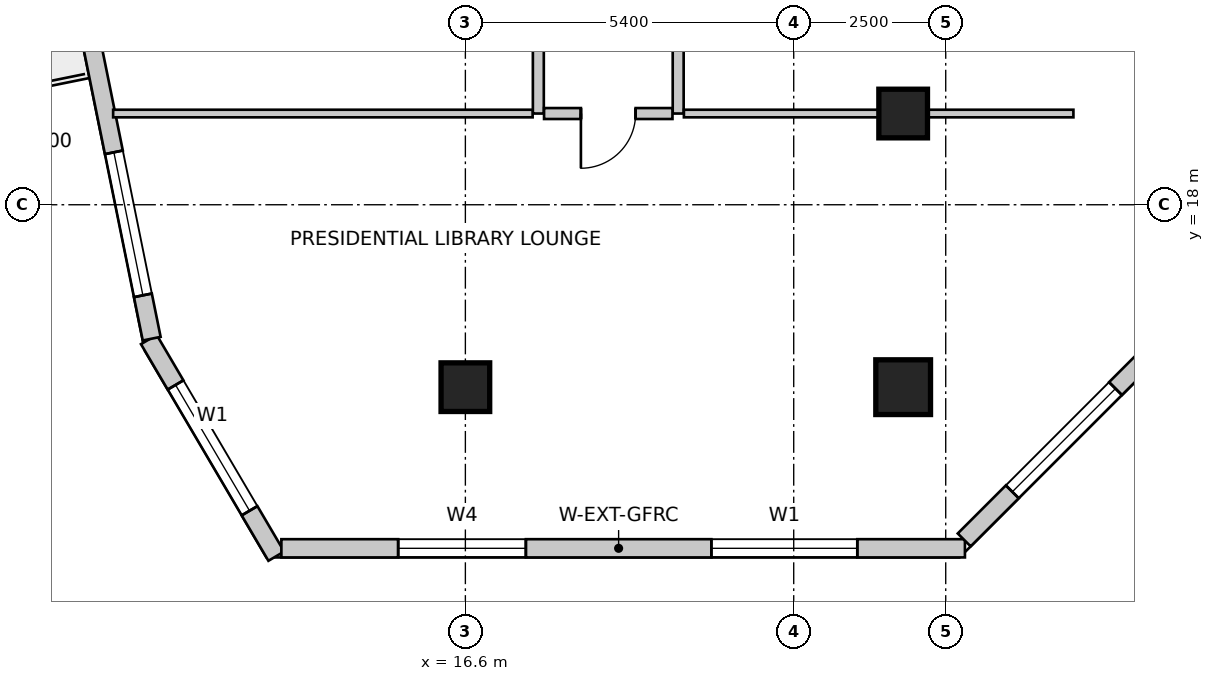
"""IFC4 building model, lengths in metres.
Left out: names, types, materials, properties, quantities, classifications, styles, units other than length and angle.
Written with IfcOpenShell. Run it as: python <this file> out.ifc"""

import sys

from ifc_helpers import new_model, si_unit, direction, frame, frame_2d, origin, origin_2d, place, context, subcontext, project, spatial, rectangle, extrude, source, transform, mapped, element, fill, save


model = new_model("IFC4")
c1 = context("Model", 3, precision=1e-05, world=origin(), true_north=direction((0.0, 1.0)))
c2 = subcontext(c1, "Body", "Model", "MODEL_VIEW")
j1 = project(units=[si_unit("LENGTHUNIT", "METRE"), si_unit("PLANEANGLEUNIT", "RADIAN")], contexts=[c1])
p1 = place(None, origin())
s1 = spatial("IfcSite", under=j1, at=p1, CompositionType="ELEMENT")
p2 = place(p1, origin())
s2 = spatial("IfcBuilding", under=s1, at=p2, CompositionType="ELEMENT")
p3 = place(p2, frame((0.0, 0.0, 164.6)))
s3 = spatial("IfcBuildingStorey", under=s2, at=p3, CompositionType="ELEMENT", Elevation=164.6)
m1 = source(origin(), c2, "Body", "SweptSolid", [
    extrude(rectangle(XDim=0.8, YDim=0.8, at=origin_2d()), origin(), (0.0, 0.0, 1.0), 3.6),
])
p4 = place(p3, frame((23.8, 19.5, 0.0), z_axis=(0.0, 0.0, 1.0), x_axis=(1.0, 0.0, 0.0)))
e1 = element("IfcColumn", 1, at=p4, inside=s3, PredefinedType="COLUMN", context=c2, shape_type="MappedRepresentation", body=[
    mapped(m1, transform((0.0, 0.0, 0.0), scale=1.0)),
])
m2 = source(origin(), c2, "Body", "SweptSolid", [
    extrude(rectangle(XDim=0.9, YDim=0.9, at=origin_2d()), origin(), (0.0, 0.0, 1.0), 3.6),
])
p5 = place(p3, frame((23.8, 15.0, 0.0), z_axis=(0.0, 0.0, 1.0), x_axis=(1.0, 0.0, 0.0)))
e2 = element("IfcColumn", 2, at=p5, inside=s3, PredefinedType="COLUMN", context=c2, shape_type="MappedRepresentation", body=[
    mapped(m2, transform((0.0, 0.0, 0.0), scale=1.0)),
])
p6 = place(p3, frame((16.6, 15.0, 0.0), z_axis=(0.0, 0.0, 1.0), x_axis=(1.0, 0.0, 0.0)))
e3 = element("IfcColumn", 3, at=p6, inside=s3, PredefinedType="COLUMN", context=c2, shape_type="MappedRepresentation", body=[
    mapped(m1, transform((0.0, 0.0, 0.0), scale=1.0)),
])
p7 = place(p3, frame((11.394, 15.784, 0.0), z_axis=(0.0, 0.0, 1.0), x_axis=(0.50698915279, -0.861952434275, 0.0)))
e4 = element("IfcWall", 4, at=p7, inside=s3, PredefinedType="SOLIDWALL", context=c2, shape_type="SweptSolid", body=[
    extrude(rectangle(XDim=4.134, YDim=0.3, at=frame_2d((2.067, 0.0))), origin(), (0.0, 0.0, 1.0), 3.35),
])
m3 = source(origin(), c2, "Body", "SweptSolid", [
    extrude(rectangle(XDim=2.4, YDim=2.2, at=frame_2d((1.2, 1.1))), frame((0.0, 0.16, 0.0), z_axis=(0.0, -1.0, 0.0), x_axis=(1.0, 0.0, 0.0)), (0.0, 0.0, 1.0), 0.32),
])
p8 = place(p7, frame((0.867, 0.0, 0.85)))
e5 = element("IfcOpeningElement", 5, at=p8, cuts=e4, PredefinedType="OPENING", context=c2, shape_type="MappedRepresentation", body=[
    mapped(m3, transform((0.0, 0.0, 0.0), scale=1.0)),
])
p9 = place(p3, frame((13.574, 12.35, 0.0), z_axis=(0.0, 0.0, 1.0), x_axis=(1.0, 0.0, 0.0)))
e6 = element("IfcWall", 6, at=p9, inside=s3, PredefinedType="SOLIDWALL", context=c2, shape_type="SweptSolid", body=[
    extrude(rectangle(XDim=11.242, YDim=0.3, at=frame_2d((5.621, 0.0))), origin(), (0.0, 0.0, 1.0), 3.35),
])
m4 = source(origin(), c2, "Body", "SweptSolid", [
    extrude(rectangle(XDim=2.1, YDim=2.0, at=frame_2d((1.05, 1.0))), frame((0.0, 0.16, 0.0), z_axis=(0.0, -1.0, 0.0), x_axis=(1.0, 0.0, 0.0)), (0.0, 0.0, 1.0), 0.32),
])
p10 = place(p9, frame((1.921, 0.0, 0.85)))
e7 = element("IfcOpeningElement", 7, at=p10, cuts=e6, PredefinedType="OPENING", context=c2, shape_type="MappedRepresentation", body=[
    mapped(m4, transform((0.0, 0.0, 0.0), scale=1.0)),
])
p11 = place(p9, frame((7.072, 0.0, 0.85)))
e8 = element("IfcOpeningElement", 8, at=p11, cuts=e6, PredefinedType="OPENING", context=c2, shape_type="MappedRepresentation", body=[
    mapped(m3, transform((0.0, 0.0, 0.0), scale=1.0)),
])
p12 = place(p3, frame((24.804, 12.488, 0.0), z_axis=(0.0, 0.0, 1.0), x_axis=(0.70708046583, 0.707133095564, 0.0)))
e9 = element("IfcWall", 9, at=p12, inside=s3, PredefinedType="SOLIDWALL", context=c2, shape_type="SweptSolid", body=[
    extrude(rectangle(XDim=4.639, YDim=0.3, at=frame_2d((2.319, 0.0))), origin(), (0.0, 0.0, 1.0), 3.35),
])
p13 = place(p12, frame((1.119, 0.0, 0.85)))
e10 = element("IfcOpeningElement", 10, at=p13, cuts=e9, PredefinedType="OPENING", context=c2, shape_type="MappedRepresentation", body=[
    mapped(m3, transform((0.0, 0.0, 0.0), scale=1.0)),
])
p14 = place(p3, frame((8.187, 31.834, 0.0), z_axis=(0.0, 0.0, 1.0), x_axis=(0.198869838988, -0.980025911464, 0.0)))
e11 = element("IfcWall", 11, at=p14, inside=s3, PredefinedType="SOLIDWALL", context=c2, shape_type="SweptSolid", body=[
    extrude(rectangle(XDim=16.363, YDim=0.3, at=frame_2d((8.182, 0.0))), origin(), (0.0, 0.0, 1.0), 3.35),
])
m5 = source(origin(), c2, "Body", "SweptSolid", [
    extrude(rectangle(XDim=1.6, YDim=2.15, at=frame_2d((0.8, 1.075))), frame((0.0, 0.16, 0.0), z_axis=(0.0, -1.0, 0.0), x_axis=(1.0, 0.0, 0.0)), (0.0, 0.0, 1.0), 0.32),
])
p15 = place(p14, frame((9.459, 0.0, 0.0)))
e12 = element("IfcOpeningElement", 12, at=p15, cuts=e11, PredefinedType="OPENING", context=c2, shape_type="MappedRepresentation", body=[
    mapped(m5, transform((0.0, 0.0, 0.0), scale=1.0)),
])
m6 = source(origin(), c2, "Body", "SweptSolid", [
    extrude(rectangle(XDim=1.5, YDim=1.8, at=frame_2d((0.75, 0.9))), frame((0.0, 0.16, 0.0), z_axis=(0.0, -1.0, 0.0), x_axis=(1.0, 0.0, 0.0)), (0.0, 0.0, 1.0), 0.32),
])
p16 = place(p14, frame((0.981, 0.0, 0.85)))
e13 = element("IfcOpeningElement", 13, at=p16, cuts=e11, PredefinedType="OPENING", context=c2, shape_type="MappedRepresentation", body=[
    mapped(m6, transform((0.0, 0.0, 0.0), scale=1.0)),
])
p17 = place(p14, frame((4.921, 0.0, 0.85)))
e14 = element("IfcOpeningElement", 14, at=p17, cuts=e11, PredefinedType="OPENING", context=c2, shape_type="MappedRepresentation", body=[
    mapped(m3, transform((0.0, 0.0, 0.0), scale=1.0)),
])
p18 = place(p14, frame((13.236, 0.0, 0.85)))
e15 = element("IfcOpeningElement", 15, at=p18, cuts=e11, PredefinedType="OPENING", context=c2, shape_type="MappedRepresentation", body=[
    mapped(m3, transform((0.0, 0.0, 0.0), scale=1.0)),
])
p19 = place(p3, frame((17.8, 19.5, 0.0), z_axis=(0.0, 0.0, 1.0), x_axis=(0.0, 1.0, 0.0)))
e16 = element("IfcWall", 16, at=p19, inside=s3, PredefinedType="PARTITIONING", context=c2, shape_type="SweptSolid", body=[
    extrude(rectangle(XDim=11.656, YDim=0.18, at=frame_2d((5.828, 0.0))), origin(), (0.0, 0.0, 1.0), 2.803),
])
m7 = source(origin(), c2, "Body", "SweptSolid", [
    extrude(rectangle(XDim=0.9, YDim=2.15, at=frame_2d((0.45, 1.075))), frame((0.0, 0.1, 0.0), z_axis=(0.0, -1.0, 0.0), x_axis=(1.0, 0.0, 0.0)), (0.0, 0.0, 1.0), 0.2),
])
p20 = place(p19, frame((5.378, 0.0, 0.0)))
e17 = element("IfcOpeningElement", 17, at=p20, cuts=e16, PredefinedType="OPENING", context=c2, shape_type="MappedRepresentation", body=[
    mapped(m7, transform((0.0, 0.0, 0.0), scale=1.0)),
])
p21 = place(p3, frame((20.1, 28.888, 0.0), z_axis=(0.0, 0.0, 1.0), x_axis=(0.0, -1.0, 0.0)))
e18 = element("IfcWall", 18, at=p21, inside=s3, PredefinedType="PARTITIONING", context=c2, shape_type="SweptSolid", body=[
    extrude(rectangle(XDim=9.388, YDim=0.18, at=frame_2d((4.694, 0.0))), origin(), (0.0, 0.0, 1.0), 2.803),
])
p22 = place(p21, frame((4.244, 0.0, 0.0)))
e19 = element("IfcOpeningElement", 19, at=p22, cuts=e18, PredefinedType="OPENING", context=c2, shape_type="MappedRepresentation", body=[
    mapped(m7, transform((0.0, 0.0, 0.0), scale=1.0)),
])
p23 = place(p3, frame((20.006, 19.5, 0.0), z_axis=(0.0, 0.0, 1.0), x_axis=(-1.0, 0.0, 0.0)))
e20 = element("IfcWall", 20, at=p23, inside=s3, PredefinedType="PARTITIONING", context=c2, shape_type="SweptSolid", body=[
    extrude(rectangle(XDim=2.112, YDim=0.18, at=frame_2d((1.056, 0.0))), origin(), (0.0, 0.0, 1.0), 3.35),
])
p24 = place(p23, frame((0.606, 0.0, 0.0)))
e21 = element("IfcOpeningElement", 21, at=p24, cuts=e20, PredefinedType="OPENING", context=c2, shape_type="MappedRepresentation", body=[
    mapped(m7, transform((0.0, 0.0, 0.0), scale=1.0)),
])
p25 = place(p3, frame((17.706, 19.5, 0.0), z_axis=(0.0, 0.0, 1.0), x_axis=(-1.0, 0.0, 0.0)))
e22 = element("IfcWall", 22, at=p25, inside=s3, PredefinedType="PARTITIONING", context=c2, shape_type="SweptSolid", body=[
    extrude(rectangle(XDim=6.899, YDim=0.125, at=frame_2d((3.45, 0.0))), origin(), (0.0, 0.0, 1.0), 3.35),
])
p26 = place(p3, frame((26.6, 19.5, 0.0), z_axis=(0.0, 0.0, 1.0), x_axis=(-1.0, 0.0, 0.0)))
e23 = element("IfcWall", 23, at=p26, inside=s3, PredefinedType="PARTITIONING", context=c2, shape_type="SweptSolid", body=[
    extrude(rectangle(XDim=6.406, YDim=0.125, at=frame_2d((3.203, 0.0))), origin(), (0.0, 0.0, 1.0), 2.492),
])
m8 = source(origin(), c2, "Body", "SweptSolid", [
    extrude(rectangle(XDim=2.4, YDim=2.2, at=frame_2d((1.2, 1.1))), frame((0.0, -0.015, 0.0), z_axis=(0.0, -1.0, 0.0), x_axis=(1.0, 0.0, 0.0)), (0.0, 0.0, 1.0), 0.06),
])
p27 = place(p8, origin())
e24 = element("IfcWindow", 24, at=p27, inside=s3, PartitioningType="SINGLE_PANEL", PredefinedType="WINDOW", context=c2, shape_type="MappedRepresentation", body=[
    mapped(m8, transform((0.0, 0.0, 0.0), scale=1.0)),
])
fill(e5, e24)
m9 = source(origin(), c2, "Body", "SweptSolid", [
    extrude(rectangle(XDim=2.1, YDim=2.0, at=frame_2d((1.05, 1.0))), frame((0.0, -0.015, 0.0), z_axis=(0.0, -1.0, 0.0), x_axis=(1.0, 0.0, 0.0)), (0.0, 0.0, 1.0), 0.06),
])
p28 = place(p10, origin())
e25 = element("IfcWindow", 25, at=p28, inside=s3, PartitioningType="SINGLE_PANEL", PredefinedType="WINDOW", context=c2, shape_type="MappedRepresentation", body=[
    mapped(m9, transform((0.0, 0.0, 0.0), scale=1.0)),
])
fill(e7, e25)
p29 = place(p11, origin())
e26 = element("IfcWindow", 26, at=p29, inside=s3, PartitioningType="SINGLE_PANEL", PredefinedType="WINDOW", context=c2, shape_type="MappedRepresentation", body=[
    mapped(m8, transform((0.0, 0.0, 0.0), scale=1.0)),
])
fill(e8, e26)
p30 = place(p13, origin())
e27 = element("IfcWindow", 27, at=p30, inside=s3, PartitioningType="SINGLE_PANEL", PredefinedType="WINDOW", context=c2, shape_type="MappedRepresentation", body=[
    mapped(m8, transform((0.0, 0.0, 0.0), scale=1.0)),
])
fill(e10, e27)
p31 = place(p18, origin())
e28 = element("IfcWindow", 28, at=p31, inside=s3, PartitioningType="SINGLE_PANEL", PredefinedType="WINDOW", context=c2, shape_type="MappedRepresentation", body=[
    mapped(m8, transform((0.0, 0.0, 0.0), scale=1.0)),
])
fill(e15, e28)
m10 = source(origin(), c2, "Body", "SweptSolid", [
    extrude(rectangle(XDim=0.9, YDim=2.15, at=frame_2d((0.45, 1.075))), frame((0.0, 0.025, 0.0), z_axis=(0.0, -1.0, 0.0), x_axis=(1.0, 0.0, 0.0)), (0.0, 0.0, 1.0), 0.05),
])
p32 = place(p24, origin())
e29 = element("IfcDoor", 29, at=p32, inside=s3, OperationType="SINGLE_SWING_RIGHT", PredefinedType="DOOR", context=c2, shape_type="MappedRepresentation", body=[
    mapped(m10, transform((0.0, 0.0, 0.0), scale=1.0)),
])
fill(e21, e29)
save(model, sys.argv[1])
